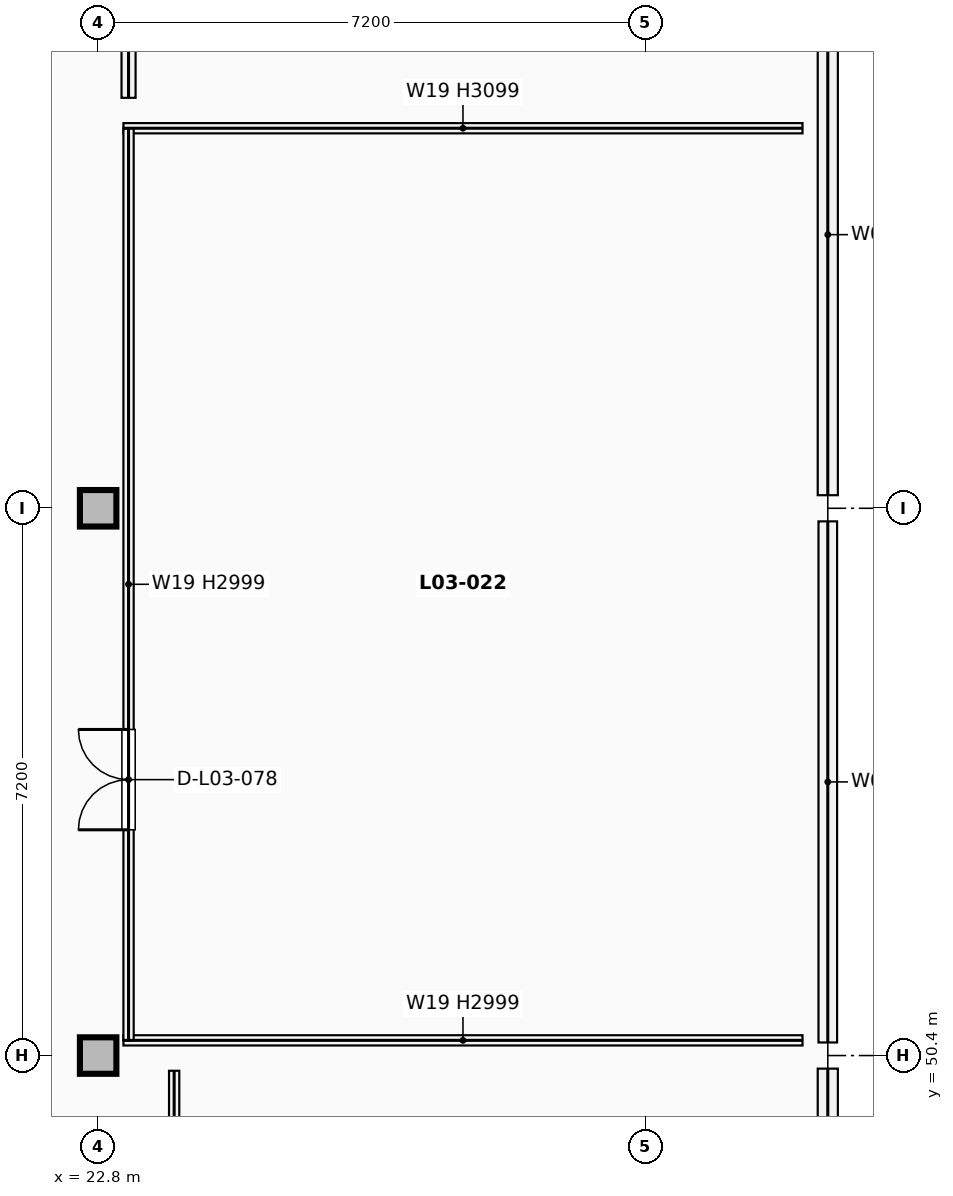
"""IFC4 building model, lengths in metres.
Left out: names, types, materials, properties, quantities, classifications, styles, units other than length and angle.
Written with IfcOpenShell. Run it as: python <this file> out.ifc"""

import sys

from ifc_helpers import new_model, si_unit, direction, frame, frame_2d, origin, origin_2d, place, context, subcontext, project, spatial, rectangle, extrude, element, fill, save


model = new_model("IFC4")
c1 = context("Model", 3, precision=1e-05, world=origin(), true_north=direction((0.0, 1.0)))
c2 = subcontext(c1, "Body", "Model", "MODEL_VIEW")
j1 = project(units=[si_unit("LENGTHUNIT", "METRE"), si_unit("PLANEANGLEUNIT", "RADIAN")], contexts=[c1])
p1 = place(None, origin())
s1 = spatial("IfcSite", under=j1, at=p1, CompositionType="ELEMENT")
p2 = place(p1, origin())
s2 = spatial("IfcBuilding", under=s1, at=p2, CompositionType="ELEMENT")
p3 = place(p2, frame((0.0, 0.0, 13.6)))
s3 = spatial("IfcBuildingStorey", under=s2, at=p3, CompositionType="ELEMENT", Elevation=13.6)
for number, where, z_axis, x_axis in (
    (1, (22.8, 50.4, 0.0), (0.0, 0.0, 1.0), (1.0, 0.0, 0.0)),
    (2, (22.8, 57.6, 0.0), (0.0, 0.0, 1.0), (1.0, 0.0, 0.0)),
):
    element("IfcColumn", number, at=place(p3, frame(where, z_axis=z_axis, x_axis=x_axis)), inside=s3, PredefinedType="COLUMN", context=c2, shape_type="SweptSolid", body=[
        extrude(rectangle(XDim=0.48, YDim=0.48, at=origin_2d()), origin(), (0.0, 0.0, 1.0), 3.74),
    ])
p4 = place(p3, frame((32.4, 44.4, 0.0), z_axis=(0.0, 0.0, 1.0), x_axis=(0.0, 1.0, 0.0)))
e3 = element("IfcWall", 3, at=p4, inside=s3, PredefinedType="SOLIDWALL", context=c2, shape_type="SweptSolid", body=[
    extrude(rectangle(XDim=5.828, YDim=0.265, at=frame_2d((2.914, 0.0))), origin(), (0.0, 0.0, 1.0), 2.999),
])
p5 = place(p3, frame((32.4, 50.572, 0.0), z_axis=(0.0, 0.0, 1.0), x_axis=(0.0, 1.0, 0.0)))
e4 = element("IfcWall", 4, at=p5, inside=s3, PredefinedType="SOLIDWALL", context=c2, shape_type="SweptSolid", body=[
    extrude(rectangle(XDim=6.856, YDim=0.245, at=frame_2d((3.428, 0.0))), origin(), (0.0, 0.0, 1.0), 2.999),
])
p6 = place(p3, frame((32.4, 57.772, 0.0), z_axis=(0.0, 0.0, 1.0), x_axis=(0.0, 1.0, 0.0)))
e5 = element("IfcWall", 5, at=p6, inside=s3, PredefinedType="SOLIDWALL", context=c2, shape_type="SweptSolid", body=[
    extrude(rectangle(XDim=6.856, YDim=0.265, at=frame_2d((3.428, 0.0))), origin(), (0.0, 0.0, 1.0), 2.999),
])
p7 = place(p3, frame((23.133, 50.6, 0.0), z_axis=(0.0, 0.0, 1.0), x_axis=(1.0, 0.0, 0.0)))
e6 = element("IfcWall", 6, at=p7, inside=s3, PredefinedType="PARTITIONING", context=c2, shape_type="SweptSolid", body=[
    extrude(rectangle(XDim=8.935, YDim=0.135, at=frame_2d((4.467, 0.0))), origin(), (0.0, 0.0, 1.0), 2.999),
])
p8 = place(p3, frame((23.133, 62.6, 0.0), z_axis=(0.0, 0.0, 1.0), x_axis=(1.0, 0.0, 0.0)))
e7 = element("IfcWall", 7, at=p8, inside=s3, PredefinedType="PARTITIONING", context=c2, shape_type="SweptSolid", body=[
    extrude(rectangle(XDim=8.935, YDim=0.135, at=frame_2d((4.467, 0.0))), origin(), (0.0, 0.0, 1.0), 3.099),
])
p9 = place(p3, frame((23.2, 50.6, 0.0), z_axis=(0.0, 0.0, 1.0), x_axis=(0.0, 1.0, 0.0)))
e8 = element("IfcWall", 8, at=p9, inside=s3, PredefinedType="PARTITIONING", context=c2, shape_type="SweptSolid", body=[
    extrude(rectangle(XDim=12.0, YDim=0.135, at=frame_2d((6.0, 0.0))), origin(), (0.0, 0.0, 1.0), 2.999),
])
p10 = place(p9, frame((2.77, 0.0, 0.0)))
e9 = element("IfcOpeningElement", 9, at=p10, cuts=e8, PredefinedType="OPENING", context=c2, shape_type="SweptSolid", body=[
    extrude(rectangle(XDim=1.32, YDim=2.22, at=frame_2d((0.66, 1.11))), frame((0.0, 0.078, 0.0), z_axis=(0.0, -1.0, 0.0), x_axis=(1.0, 0.0, 0.0)), (0.0, 0.0, 1.0), 0.155),
])
p11 = place(p3, frame((23.2, 63.0, 0.0), z_axis=(0.0, 0.0, 1.0), x_axis=(0.0, 1.0, 0.0)))
e10 = element("IfcWall", 10, at=p11, inside=s3, PredefinedType="PARTITIONING", context=c2, shape_type="SweptSolid", body=[
    extrude(rectangle(XDim=16.0, YDim=0.185, at=frame_2d((8.0, 0.0))), origin(), (0.0, 0.0, 1.0), 2.999),
])
p12 = place(p11, frame((11.113, 0.0, 0.0)))
e11 = element("IfcOpeningElement", 11, at=p12, cuts=e10, PredefinedType="OPENING", context=c2, shape_type="SweptSolid", body=[
    extrude(rectangle(XDim=1.05, YDim=2.15, at=frame_2d((0.525, 1.075))), frame((0.0, 0.103, 0.0), z_axis=(0.0, -1.0, 0.0), x_axis=(1.0, 0.0, 0.0)), (0.0, 0.0, 1.0), 0.205),
])
p13 = place(p3, frame((23.8, 44.8, 0.0), z_axis=(0.0, 0.0, 1.0), x_axis=(0.0, 1.0, 0.0)))
e12 = element("IfcWall", 12, at=p13, inside=s3, PredefinedType="PARTITIONING", context=c2, shape_type="SweptSolid", body=[
    extrude(rectangle(XDim=5.4, YDim=0.135, at=frame_2d((2.7, 0.0))), origin(), (0.0, 0.0, 1.0), 2.999),
])
p14 = place(p13, frame((2.18, 0.0, 0.0)))
e13 = element("IfcOpeningElement", 13, at=p14, cuts=e12, PredefinedType="OPENING", context=c2, shape_type="SweptSolid", body=[
    extrude(rectangle(XDim=1.04, YDim=2.12, at=frame_2d((0.52, 1.06))), frame((0.0, 0.078, 0.0), z_axis=(0.0, -1.0, 0.0), x_axis=(1.0, 0.0, 0.0)), (0.0, 0.0, 1.0), 0.155),
])
p15 = place(p10, origin())
e14 = element("IfcDoor", 14, at=p15, inside=s3, OperationType="DOUBLE_DOOR_SINGLE_SWING", PredefinedType="DOOR", context=c2, shape_type="SweptSolid", body=[
    extrude(rectangle(XDim=1.32, YDim=2.22, at=frame_2d((0.66, 1.11))), frame((0.0, 0.025, 0.0), z_axis=(0.0, -1.0, 0.0), x_axis=(1.0, 0.0, 0.0)), (0.0, 0.0, 1.0), 0.05),
])
fill(e9, e14)
save(model, sys.argv[1])
